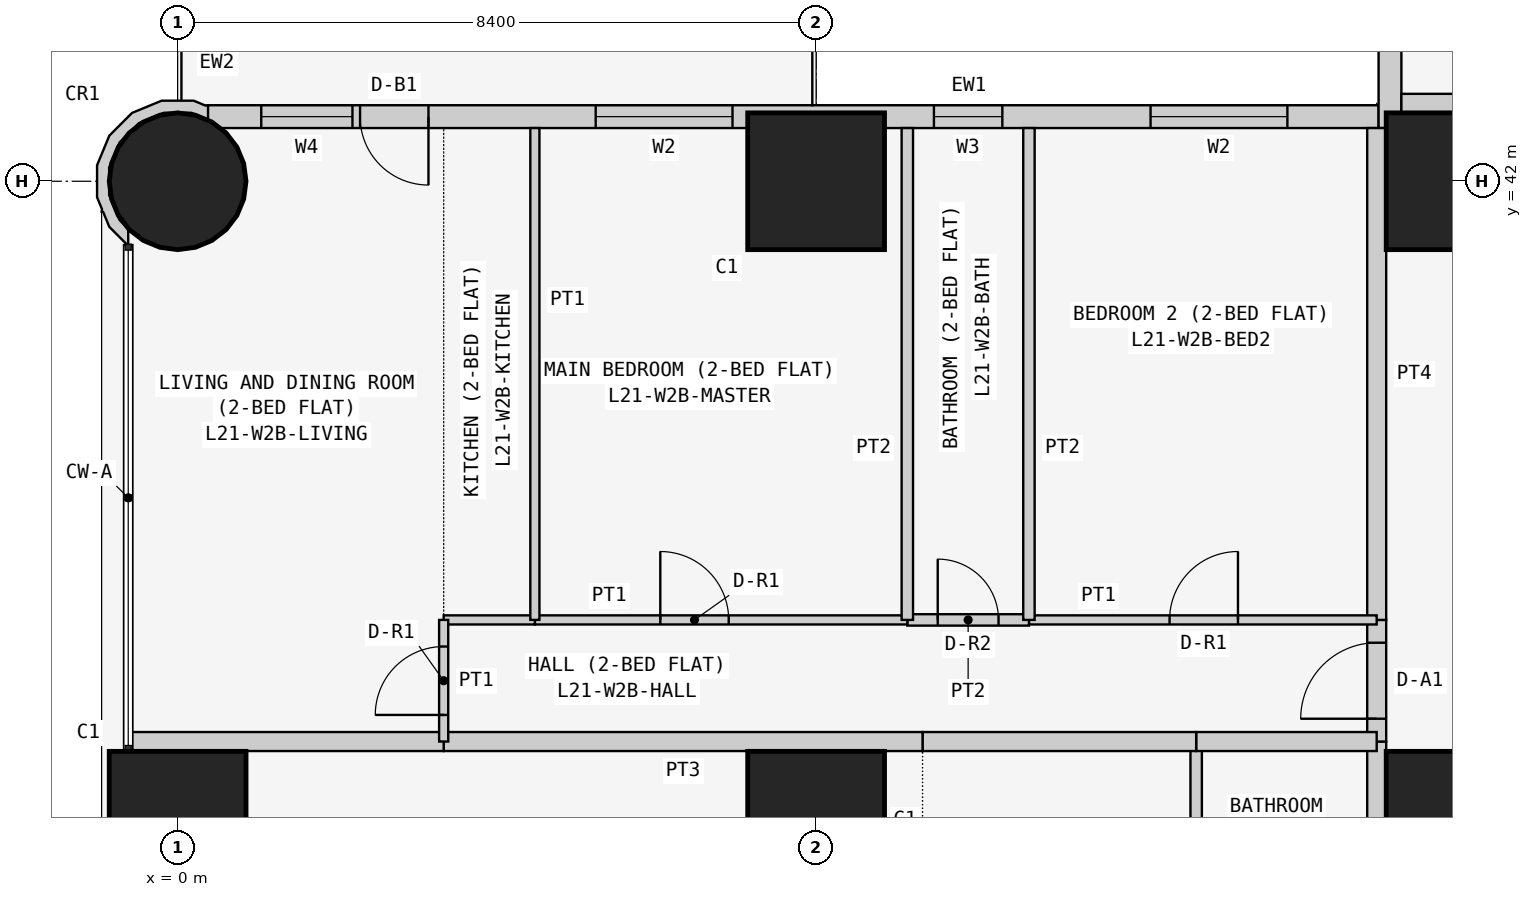
"""IFC4 building model, lengths in metres.
Left out: names, types, materials, properties, quantities, classifications, styles, units other than length and angle.
Written with IfcOpenShell. Run it as: python <this file> out.ifc"""

import sys

from ifc_helpers import new_model, si_unit, direction, frame, frame_2d, origin, origin_2d, place, context, subcontext, project, spatial, polyline, rectangle, circle, outline, extrude, element, fill, save


model = new_model("IFC4")
c1 = context("Model", 3, precision=1e-05, world=origin(), true_north=direction((0.0, 1.0)))
c2 = subcontext(c1, "Body", "Model", "MODEL_VIEW")
j1 = project(units=[si_unit("LENGTHUNIT", "METRE"), si_unit("PLANEANGLEUNIT", "RADIAN")], contexts=[c1])
p1 = place(None, origin())
s1 = spatial("IfcSite", under=j1, at=p1, CompositionType="ELEMENT")
p2 = place(p1, origin())
s2 = spatial("IfcBuilding", under=s1, at=p2, CompositionType="ELEMENT")
p3 = place(p2, frame((0.0, 0.0, 84.9)))
s3 = spatial("IfcBuildingStorey", under=s2, at=p3, CompositionType="ELEMENT", Elevation=84.9)
p4 = place(p3, frame((0.0, 33.6, 0.0), z_axis=(0.0, 0.0, 1.0), x_axis=(1.0, 0.0, 0.0)))
e1 = element("IfcColumn", 1, at=p4, inside=s3, PredefinedType="COLUMN", context=c2, shape_type="SweptSolid", body=[
    extrude(rectangle(XDim=1.8, YDim=1.8, at=origin_2d()), origin(), (0.0, 0.0, 1.0), 3.6),
])
p5 = place(p3, frame((0.0, 42.0, 0.0), z_axis=(0.0, 0.0, 1.0), x_axis=(1.0, 0.0, 0.0)))
e2 = element("IfcColumn", 2, at=p5, inside=s3, PredefinedType="COLUMN", context=c2, shape_type="SweptSolid", body=[
    extrude(circle(Radius=0.9, at=origin_2d()), origin(), (0.0, 0.0, 1.0), 3.6),
])
for number, where, z_axis, x_axis in (
    (3, (8.4, 33.6, 0.0), (0.0, 0.0, 1.0), (1.0, 0.0, 0.0)),
    (4, (8.4, 42.0, 0.0), (0.0, 0.0, 1.0), (1.0, 0.0, 0.0)),
    (5, (16.8, 33.6, 0.0), (0.0, 0.0, 1.0), (1.0, 0.0, 0.0)),
    (6, (16.8, 42.0, 0.0), (0.0, 0.0, 1.0), (1.0, 0.0, 0.0)),
):
    element("IfcColumn", number, at=place(p3, frame(where, z_axis=z_axis, x_axis=x_axis)), inside=s3, PredefinedType="COLUMN", context=c2, shape_type="SweptSolid", body=[
        extrude(rectangle(XDim=1.8, YDim=1.8, at=origin_2d()), origin(), (0.0, 0.0, 1.0), 3.6),
    ])
p6 = place(p3, frame((15.8, 42.85, 0.0), z_axis=(0.0, 0.0, 1.0), x_axis=(-1.0, 0.0, 0.0)))
e7 = element("IfcWall", 7, at=p6, inside=s3, PredefinedType="SOLIDWALL", context=c2, shape_type="SweptSolid", body=[
    extrude(rectangle(XDim=15.4, YDim=0.3, at=frame_2d((7.7, 0.0))), origin(), (0.0, 0.0, 1.0), 3.45),
])
p7 = place(p6, frame((1.2, 0.0, 0.9)))
e8 = element("IfcOpeningElement", 8, at=p7, cuts=e7, PredefinedType="OPENING", context=c2, shape_type="SweptSolid", body=[
    extrude(rectangle(XDim=1.8, YDim=1.5, at=frame_2d((0.9, 0.75))), frame((0.0, 0.16, 0.0), z_axis=(0.0, -1.0, 0.0), x_axis=(1.0, 0.0, 0.0)), (0.0, 0.0, 1.0), 0.32),
])
p8 = place(p6, frame((4.95, 0.0, 1.5)))
e9 = element("IfcOpeningElement", 9, at=p8, cuts=e7, PredefinedType="OPENING", context=c2, shape_type="SweptSolid", body=[
    extrude(rectangle(XDim=0.9, YDim=0.7, at=frame_2d((0.45, 0.35))), frame((0.0, 0.16, 0.0), z_axis=(0.0, -1.0, 0.0), x_axis=(1.0, 0.0, 0.0)), (0.0, 0.0, 1.0), 0.32),
])
p9 = place(p6, frame((8.5, 0.0, 0.9)))
e10 = element("IfcOpeningElement", 10, at=p9, cuts=e7, PredefinedType="OPENING", context=c2, shape_type="SweptSolid", body=[
    extrude(rectangle(XDim=1.8, YDim=1.5, at=frame_2d((0.9, 0.75))), frame((0.0, 0.16, 0.0), z_axis=(0.0, -1.0, 0.0), x_axis=(1.0, 0.0, 0.0)), (0.0, 0.0, 1.0), 0.32),
])
p10 = place(p6, frame((12.5, 0.0, 0.0)))
e11 = element("IfcOpeningElement", 11, at=p10, cuts=e7, PredefinedType="OPENING", context=c2, shape_type="SweptSolid", body=[
    extrude(rectangle(XDim=0.9, YDim=2.4, at=frame_2d((0.45, 1.2))), frame((0.0, 0.16, 0.0), z_axis=(0.0, -1.0, 0.0), x_axis=(1.0, 0.0, 0.0)), (0.0, 0.0, 1.0), 0.32),
])
p11 = place(p6, frame((13.5, 0.0, 0.9)))
e12 = element("IfcOpeningElement", 12, at=p11, cuts=e7, PredefinedType="OPENING", context=c2, shape_type="SweptSolid", body=[
    extrude(rectangle(XDim=1.2, YDim=1.5, at=frame_2d((0.6, 0.75))), frame((0.0, 0.16, 0.0), z_axis=(0.0, -1.0, 0.0), x_axis=(1.0, 0.0, 0.0)), (0.0, 0.0, 1.0), 0.32),
])
p12 = place(p3, frame((15.95, 58.4, 0.0), z_axis=(0.0, 0.0, 1.0), x_axis=(0.0, -1.0, 0.0)))
e13 = element("IfcWall", 13, at=p12, inside=s3, PredefinedType="SOLIDWALL", context=c2, shape_type="SweptSolid", body=[
    extrude(rectangle(XDim=15.7, YDim=0.3, at=frame_2d((7.85, 0.0))), origin(), (0.0, 0.0, 1.0), 3.45),
])
p13 = place(p12, frame((12.4, 0.0, 0.9)))
e14 = element("IfcOpeningElement", 14, at=p13, cuts=e13, PredefinedType="OPENING", context=c2, shape_type="SweptSolid", body=[
    extrude(rectangle(XDim=1.8, YDim=1.5, at=frame_2d((0.9, 0.75))), frame((0.0, 0.16, 0.0), z_axis=(0.0, -1.0, 0.0), x_axis=(1.0, 0.0, 0.0)), (0.0, 0.0, 1.0), 0.32),
])
p14 = place(p12, frame((9.55, 0.0, 1.5)))
e15 = element("IfcOpeningElement", 15, at=p14, cuts=e13, PredefinedType="OPENING", context=c2, shape_type="SweptSolid", body=[
    extrude(rectangle(XDim=0.9, YDim=0.7, at=frame_2d((0.45, 0.35))), frame((0.0, 0.16, 0.0), z_axis=(0.0, -1.0, 0.0), x_axis=(1.0, 0.0, 0.0)), (0.0, 0.0, 1.0), 0.32),
])
p15 = place(p12, frame((5.1, 0.0, 0.9)))
e16 = element("IfcOpeningElement", 16, at=p15, cuts=e13, PredefinedType="OPENING", context=c2, shape_type="SweptSolid", body=[
    extrude(rectangle(XDim=1.8, YDim=1.5, at=frame_2d((0.9, 0.75))), frame((0.0, 0.16, 0.0), z_axis=(0.0, -1.0, 0.0), x_axis=(1.0, 0.0, 0.0)), (0.0, 0.0, 1.0), 0.32),
])
p16 = place(p12, frame((2.0, 0.0, 0.0)))
e17 = element("IfcOpeningElement", 17, at=p16, cuts=e13, PredefinedType="OPENING", context=c2, shape_type="SweptSolid", body=[
    extrude(rectangle(XDim=0.9, YDim=2.4, at=frame_2d((0.45, 1.2))), frame((0.0, 0.16, 0.0), z_axis=(0.0, -1.0, 0.0), x_axis=(1.0, 0.0, 0.0)), (0.0, 0.0, 1.0), 0.32),
])
p17 = place(p12, frame((0.7, 0.0, 0.9)))
e18 = element("IfcOpeningElement", 18, at=p17, cuts=e13, PredefinedType="OPENING", context=c2, shape_type="SweptSolid", body=[
    extrude(rectangle(XDim=1.2, YDim=1.5, at=frame_2d((0.6, 0.75))), frame((0.0, 0.16, 0.0), z_axis=(0.0, -1.0, 0.0), x_axis=(1.0, 0.0, 0.0)), (0.0, 0.0, 1.0), 0.32),
])
p18 = place(p3, frame((0.364, 42.91, 0.0), z_axis=(0.0, 0.0, 1.0), x_axis=(-0.926129809145, 0.377204953059, 0.0)))
e19 = element("IfcWall", 19, at=p18, inside=s3, PredefinedType="SOLIDWALL", context=c2, shape_type="SweptSolid", body=[
    extrude(outline(polyline([(0.36, 1.803), (0.509, 1.741), (0.761, 1.486), (0.896, 1.154), (0.894, 0.795), (0.755, 0.465), (0.5, 0.213), (0.168, 0.078), (-0.1, 0.08), (0.001, -0.097), (0.03, -0.08), (0.199, -0.081), (0.589, 0.078), (0.889, 0.374), (1.053, 0.763), (1.055, 1.185), (0.896, 1.575), (0.778, 1.695), (0.769, 1.728), (0.75, 1.723), (0.6, 1.875), (0.295, 2.003), (0.281, 1.998), (0.36, 1.803)])), origin(), (0.0, 0.0, 1.0), 3.45),
])
p19 = place(p3, frame((16.1, 43.025, 0.0), z_axis=(0.0, 0.0, 1.0), x_axis=(1.0, 0.0, 0.0)))
e20 = element("IfcWall", 20, at=p19, inside=s3, PredefinedType="PARTITIONING", context=c2, shape_type="SweptSolid", body=[
    extrude(rectangle(XDim=6.471, YDim=0.25, at=frame_2d((3.235, 0.0))), origin(), (0.0, 0.0, 1.0), 3.45),
])
p20 = place(p3, frame((15.775, 32.0, 0.0), z_axis=(0.0, 0.0, 1.0), x_axis=(0.0, 1.0, 0.0)))
e21 = element("IfcWall", 21, at=p20, inside=s3, PredefinedType="PARTITIONING", context=c2, shape_type="SweptSolid", body=[
    extrude(rectangle(XDim=2.629, YDim=0.25, at=frame_2d((1.314, 0.0))), origin(), (0.0, 0.0, 1.0), 3.45),
])
p21 = place(p3, frame((15.775, 34.629, 0.0), z_axis=(0.0, 0.0, 1.0), x_axis=(0.0, 1.0, 0.0)))
e22 = element("IfcWall", 22, at=p21, inside=s3, PredefinedType="PARTITIONING", context=c2, shape_type="SweptSolid", body=[
    extrude(rectangle(XDim=1.6, YDim=0.25, at=frame_2d((0.8, 0.0))), origin(), (0.0, 0.0, 1.0), 3.45),
])
p22 = place(p21, frame((0.3, 0.0, 0.0)))
e23 = element("IfcOpeningElement", 23, at=p22, cuts=e22, PredefinedType="OPENING", context=c2, shape_type="SweptSolid", body=[
    extrude(rectangle(XDim=1.0, YDim=2.1, at=frame_2d((0.5, 1.05))), frame((0.0, 0.135, 0.0), z_axis=(0.0, -1.0, 0.0), x_axis=(1.0, 0.0, 0.0)), (0.0, 0.0, 1.0), 0.27),
])
p23 = place(p3, frame((15.775, 36.229, 0.0), z_axis=(0.0, 0.0, 1.0), x_axis=(0.0, 1.0, 0.0)))
e24 = element("IfcWall", 24, at=p23, inside=s3, PredefinedType="PARTITIONING", context=c2, shape_type="SweptSolid", body=[
    extrude(rectangle(XDim=6.471, YDim=0.25, at=frame_2d((3.235, 0.0))), origin(), (0.0, 0.0, 1.0), 3.45),
])
p24 = place(p3, frame((13.4, 32.0, 0.0), z_axis=(0.0, 0.0, 1.0), x_axis=(0.0, 1.0, 0.0)))
e25 = element("IfcWall", 25, at=p24, inside=s3, PredefinedType="PARTITIONING", context=c2, shape_type="SweptSolid", body=[
    extrude(rectangle(XDim=2.629, YDim=0.15, at=frame_2d((1.314, 0.0))), origin(), (0.0, 0.0, 1.0), 3.45),
])
p25 = place(p3, frame((13.4, 34.629, 0.0), z_axis=(0.0, 0.0, 1.0), x_axis=(1.0, 0.0, 0.0)))
e26 = element("IfcWall", 26, at=p25, inside=s3, PredefinedType="PARTITIONING", context=c2, shape_type="SweptSolid", body=[
    extrude(rectangle(XDim=2.375, YDim=0.25, at=frame_2d((1.188, 0.0))), origin(), (0.0, 0.0, 1.0), 3.45),
])
p26 = place(p3, frame((9.8, 34.629, 0.0), z_axis=(0.0, 0.0, 1.0), x_axis=(1.0, 0.0, 0.0)))
e27 = element("IfcWall", 27, at=p26, inside=s3, PredefinedType="PARTITIONING", context=c2, shape_type="SweptSolid", body=[
    extrude(rectangle(XDim=3.6, YDim=0.25, at=frame_2d((1.8, 0.0))), origin(), (0.0, 0.0, 1.0), 3.45),
])
p27 = place(p3, frame((3.5, 34.629, 0.0), z_axis=(0.0, 0.0, 1.0), x_axis=(1.0, 0.0, 0.0)))
e28 = element("IfcWall", 28, at=p27, inside=s3, PredefinedType="PARTITIONING", context=c2, shape_type="SweptSolid", body=[
    extrude(rectangle(XDim=6.3, YDim=0.25, at=frame_2d((3.15, 0.0))), origin(), (0.0, 0.0, 1.0), 3.45),
])
p28 = place(p3, frame((-0.65, 34.629, 0.0), z_axis=(0.0, 0.0, 1.0), x_axis=(1.0, 0.0, 0.0)))
e29 = element("IfcWall", 29, at=p28, inside=s3, PredefinedType="PARTITIONING", context=c2, shape_type="SweptSolid", body=[
    extrude(rectangle(XDim=4.15, YDim=0.25, at=frame_2d((2.075, 0.0))), origin(), (0.0, 0.0, 1.0), 3.45),
])
p29 = place(p3, frame((11.2, 36.229, 0.0), z_axis=(0.0, 0.0, 1.0), x_axis=(1.0, 0.0, 0.0)))
e30 = element("IfcWall", 30, at=p29, inside=s3, PredefinedType="PARTITIONING", context=c2, shape_type="SweptSolid", body=[
    extrude(rectangle(XDim=4.575, YDim=0.12, at=frame_2d((2.288, 0.0))), origin(), (0.0, 0.0, 1.0), 3.45),
])
p30 = place(p29, frame((1.85, 0.0, 0.0)))
e31 = element("IfcOpeningElement", 31, at=p30, cuts=e30, PredefinedType="OPENING", context=c2, shape_type="SweptSolid", body=[
    extrude(rectangle(XDim=0.9, YDim=2.1, at=frame_2d((0.45, 1.05))), frame((0.0, 0.07, 0.0), z_axis=(0.0, -1.0, 0.0), x_axis=(1.0, 0.0, 0.0)), (0.0, 0.0, 1.0), 0.14),
])
p31 = place(p3, frame((9.6, 36.229, 0.0), z_axis=(0.0, 0.0, 1.0), x_axis=(1.0, 0.0, 0.0)))
e32 = element("IfcWall", 32, at=p31, inside=s3, PredefinedType="PARTITIONING", context=c2, shape_type="SweptSolid", body=[
    extrude(rectangle(XDim=1.6, YDim=0.15, at=frame_2d((0.8, 0.0))), origin(), (0.0, 0.0, 1.0), 3.45),
])
p32 = place(p31, frame((0.4, 0.0, 0.0)))
e33 = element("IfcOpeningElement", 33, at=p32, cuts=e32, PredefinedType="OPENING", context=c2, shape_type="SweptSolid", body=[
    extrude(rectangle(XDim=0.8, YDim=2.1, at=frame_2d((0.4, 1.05))), frame((0.0, 0.085, 0.0), z_axis=(0.0, -1.0, 0.0), x_axis=(1.0, 0.0, 0.0)), (0.0, 0.0, 1.0), 0.17),
])
p33 = place(p3, frame((4.7, 36.229, 0.0), z_axis=(0.0, 0.0, 1.0), x_axis=(1.0, 0.0, 0.0)))
e34 = element("IfcWall", 34, at=p33, inside=s3, PredefinedType="PARTITIONING", context=c2, shape_type="SweptSolid", body=[
    extrude(rectangle(XDim=4.9, YDim=0.12, at=frame_2d((2.45, 0.0))), origin(), (0.0, 0.0, 1.0), 3.45),
])
p34 = place(p33, frame((1.65, 0.0, 0.0)))
e35 = element("IfcOpeningElement", 35, at=p34, cuts=e34, PredefinedType="OPENING", context=c2, shape_type="SweptSolid", body=[
    extrude(rectangle(XDim=0.9, YDim=2.1, at=frame_2d((0.45, 1.05))), frame((0.0, 0.07, 0.0), z_axis=(0.0, -1.0, 0.0), x_axis=(1.0, 0.0, 0.0)), (0.0, 0.0, 1.0), 0.14),
])
p35 = place(p3, frame((3.5, 36.229, 0.0), z_axis=(0.0, 0.0, 1.0), x_axis=(1.0, 0.0, 0.0)))
e36 = element("IfcWall", 36, at=p35, inside=s3, PredefinedType="PARTITIONING", context=c2, shape_type="SweptSolid", body=[
    extrude(rectangle(XDim=1.2, YDim=0.12, at=frame_2d((0.6, 0.0))), origin(), (0.0, 0.0, 1.0), 3.45),
])
p36 = place(p3, frame((3.5, 34.629, 0.0), z_axis=(0.0, 0.0, 1.0), x_axis=(0.0, 1.0, 0.0)))
e37 = element("IfcWall", 37, at=p36, inside=s3, PredefinedType="PARTITIONING", context=c2, shape_type="SweptSolid", body=[
    extrude(rectangle(XDim=1.6, YDim=0.12, at=frame_2d((0.8, 0.0))), origin(), (0.0, 0.0, 1.0), 3.45),
])
p37 = place(p36, frame((0.35, 0.0, 0.0)))
e38 = element("IfcOpeningElement", 38, at=p37, cuts=e37, PredefinedType="OPENING", context=c2, shape_type="SweptSolid", body=[
    extrude(rectangle(XDim=0.9, YDim=2.1, at=frame_2d((0.45, 1.05))), frame((0.0, 0.07, 0.0), z_axis=(0.0, -1.0, 0.0), x_axis=(1.0, 0.0, 0.0)), (0.0, 0.0, 1.0), 0.14),
])
for number, where, z_axis, x_axis in (
    (39, (11.2, 36.229, 0.0), (0.0, 0.0, 1.0), (0.0, 1.0, 0.0)),
    (40, (9.6, 36.229, 0.0), (0.0, 0.0, 1.0), (0.0, 1.0, 0.0)),
):
    element("IfcWall", number, at=place(p3, frame(where, z_axis=z_axis, x_axis=x_axis)), inside=s3, PredefinedType="PARTITIONING", context=c2, shape_type="SweptSolid", body=[
        extrude(rectangle(XDim=6.471, YDim=0.15, at=frame_2d((3.235, 0.0))), origin(), (0.0, 0.0, 1.0), 3.45),
    ])
p38 = place(p3, frame((4.7, 36.229, 0.0), z_axis=(0.0, 0.0, 1.0), x_axis=(0.0, 1.0, 0.0)))
e41 = element("IfcWall", 41, at=p38, inside=s3, PredefinedType="PARTITIONING", context=c2, shape_type="SweptSolid", body=[
    extrude(rectangle(XDim=6.471, YDim=0.12, at=frame_2d((3.235, 0.0))), origin(), (0.0, 0.0, 1.0), 3.45),
])
p39 = place(p7, origin())
e42 = element("IfcWindow", 42, at=p39, inside=s3, PartitioningType="SINGLE_PANEL", PredefinedType="WINDOW", context=c2, shape_type="SweptSolid", body=[
    extrude(rectangle(XDim=1.8, YDim=1.5, at=frame_2d((0.9, 0.75))), frame((0.0, 0.03, 0.0), z_axis=(0.0, -1.0, 0.0), x_axis=(1.0, 0.0, 0.0)), (0.0, 0.0, 1.0), 0.06),
])
fill(e8, e42)
p40 = place(p8, origin())
e43 = element("IfcWindow", 43, at=p40, inside=s3, PartitioningType="SINGLE_PANEL", PredefinedType="WINDOW", context=c2, shape_type="SweptSolid", body=[
    extrude(rectangle(XDim=0.9, YDim=0.7, at=frame_2d((0.45, 0.35))), frame((0.0, 0.03, 0.0), z_axis=(0.0, -1.0, 0.0), x_axis=(1.0, 0.0, 0.0)), (0.0, 0.0, 1.0), 0.06),
])
fill(e9, e43)
p41 = place(p9, origin())
e44 = element("IfcWindow", 44, at=p41, inside=s3, PartitioningType="SINGLE_PANEL", PredefinedType="WINDOW", context=c2, shape_type="SweptSolid", body=[
    extrude(rectangle(XDim=1.8, YDim=1.5, at=frame_2d((0.9, 0.75))), frame((0.0, 0.03, 0.0), z_axis=(0.0, -1.0, 0.0), x_axis=(1.0, 0.0, 0.0)), (0.0, 0.0, 1.0), 0.06),
])
fill(e10, e44)
p42 = place(p10, origin())
e45 = element("IfcDoor", 45, at=p42, inside=s3, OperationType="SINGLE_SWING_LEFT", PredefinedType="DOOR", context=c2, shape_type="SweptSolid", body=[
    extrude(rectangle(XDim=0.9, YDim=2.4, at=frame_2d((0.45, 1.2))), frame((0.0, 0.025, 0.0), z_axis=(0.0, -1.0, 0.0), x_axis=(1.0, 0.0, 0.0)), (0.0, 0.0, 1.0), 0.05),
])
fill(e11, e45)
p43 = place(p11, origin())
e46 = element("IfcWindow", 46, at=p43, inside=s3, PartitioningType="SINGLE_PANEL", PredefinedType="WINDOW", context=c2, shape_type="SweptSolid", body=[
    extrude(rectangle(XDim=1.2, YDim=1.5, at=frame_2d((0.6, 0.75))), frame((0.0, 0.03, 0.0), z_axis=(0.0, -1.0, 0.0), x_axis=(1.0, 0.0, 0.0)), (0.0, 0.0, 1.0), 0.06),
])
fill(e12, e46)
p44 = place(p22, origin())
e47 = element("IfcDoor", 47, at=p44, inside=s3, OperationType="SINGLE_SWING_LEFT", PredefinedType="DOOR", context=c2, shape_type="SweptSolid", body=[
    extrude(rectangle(XDim=1.0, YDim=2.1, at=frame_2d((0.5, 1.05))), frame((0.0, 0.025, 0.0), z_axis=(0.0, -1.0, 0.0), x_axis=(1.0, 0.0, 0.0)), (0.0, 0.0, 1.0), 0.05),
])
fill(e23, e47)
p45 = place(p30, origin())
e48 = element("IfcDoor", 48, at=p45, inside=s3, OperationType="SINGLE_SWING_RIGHT", PredefinedType="DOOR", context=c2, shape_type="SweptSolid", body=[
    extrude(rectangle(XDim=0.9, YDim=2.1, at=frame_2d((0.45, 1.05))), frame((0.0, 0.025, 0.0), z_axis=(0.0, -1.0, 0.0), x_axis=(1.0, 0.0, 0.0)), (0.0, 0.0, 1.0), 0.05),
])
fill(e31, e48)
p46 = place(p32, origin())
e49 = element("IfcDoor", 49, at=p46, inside=s3, OperationType="SINGLE_SWING_LEFT", PredefinedType="DOOR", context=c2, shape_type="SweptSolid", body=[
    extrude(rectangle(XDim=0.8, YDim=2.1, at=frame_2d((0.4, 1.05))), frame((0.0, 0.025, 0.0), z_axis=(0.0, -1.0, 0.0), x_axis=(1.0, 0.0, 0.0)), (0.0, 0.0, 1.0), 0.05),
])
fill(e33, e49)
p47 = place(p34, origin())
e50 = element("IfcDoor", 50, at=p47, inside=s3, OperationType="SINGLE_SWING_LEFT", PredefinedType="DOOR", context=c2, shape_type="SweptSolid", body=[
    extrude(rectangle(XDim=0.9, YDim=2.1, at=frame_2d((0.45, 1.05))), frame((0.0, 0.025, 0.0), z_axis=(0.0, -1.0, 0.0), x_axis=(1.0, 0.0, 0.0)), (0.0, 0.0, 1.0), 0.05),
])
fill(e35, e50)
p48 = place(p37, origin())
e51 = element("IfcDoor", 51, at=p48, inside=s3, OperationType="SINGLE_SWING_LEFT", PredefinedType="DOOR", context=c2, shape_type="SweptSolid", body=[
    extrude(rectangle(XDim=0.9, YDim=2.1, at=frame_2d((0.45, 1.05))), frame((0.0, 0.025, 0.0), z_axis=(0.0, -1.0, 0.0), x_axis=(1.0, 0.0, 0.0)), (0.0, 0.0, 1.0), 0.05),
])
fill(e38, e51)
save(model, sys.argv[1])
